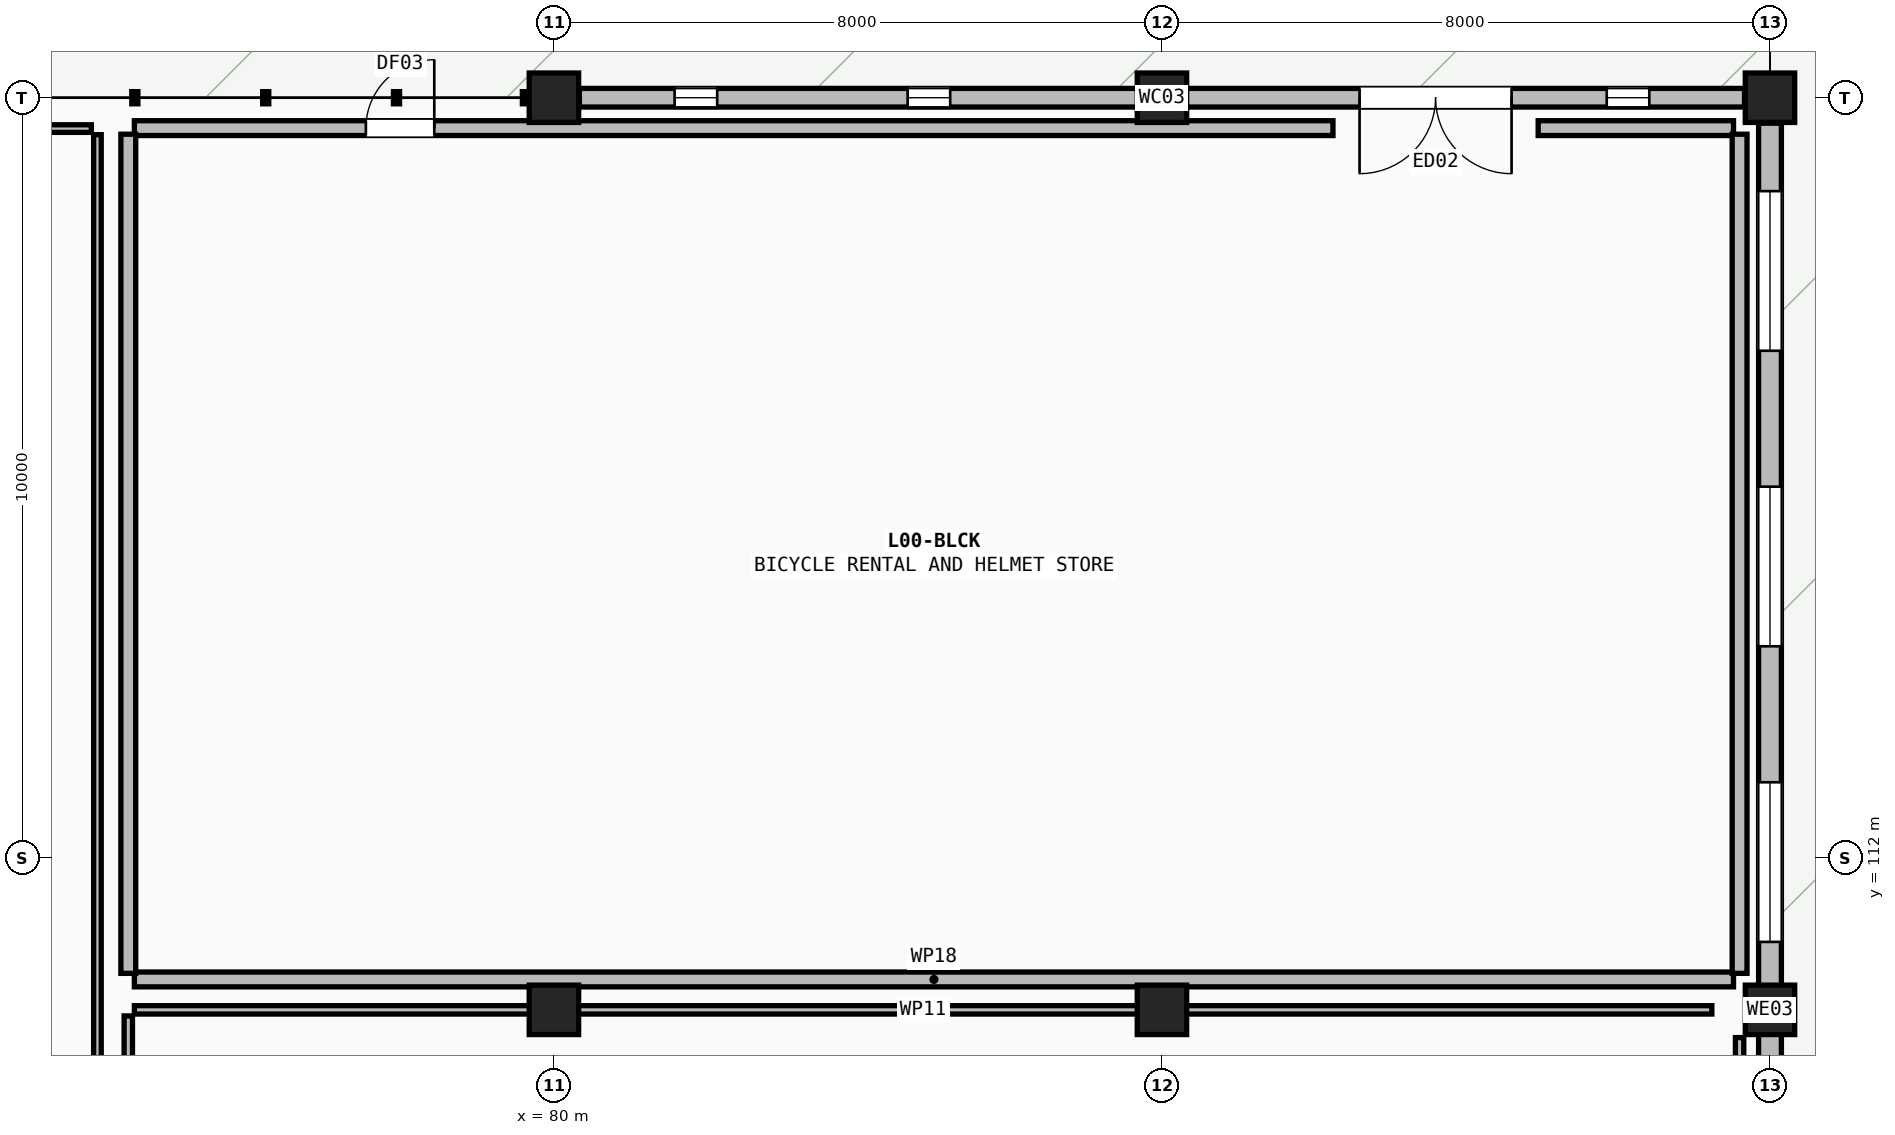
"""IFC4 building model, lengths in metres.
Left out: names, types, materials, properties, quantities, classifications, styles, units other than length and angle.
Written with IfcOpenShell. Run it as: python <this file> out.ifc"""

import sys

from ifc_helpers import new_model, si_unit, direction, frame, frame_2d, origin, origin_2d, place, context, subcontext, project, spatial, rectangle, extrude, element, fill, save


model = new_model("IFC4")
c1 = context("Model", 3, precision=1e-05, world=origin(), true_north=direction((0.0, 1.0)))
c2 = subcontext(c1, "Body", "Model", "MODEL_VIEW")
j1 = project(units=[si_unit("LENGTHUNIT", "METRE"), si_unit("PLANEANGLEUNIT", "RADIAN")], contexts=[c1])
p1 = place(None, origin())
s1 = spatial("IfcSite", under=j1, at=p1, CompositionType="ELEMENT")
p2 = place(p1, origin())
s2 = spatial("IfcBuilding", under=s1, at=p2, CompositionType="ELEMENT")
p3 = place(p2, origin())
s3 = spatial("IfcBuildingStorey", under=s2, at=p3, CompositionType="ELEMENT", Elevation=0.0)
for number, where, z_axis, x_axis in (
    (1, (80.0, 110.0, 0.0), (0.0, 0.0, 1.0), (1.0, 0.0, 0.0)),
    (2, (80.0, 122.0, 0.0), (0.0, 0.0, 1.0), (1.0, 0.0, 0.0)),
    (3, (88.0, 110.0, 0.0), (0.0, 0.0, 1.0), (1.0, 0.0, 0.0)),
    (4, (88.0, 122.0, 0.0), (0.0, 0.0, 1.0), (1.0, 0.0, 0.0)),
    (5, (96.0, 110.0, 0.0), (0.0, 0.0, 1.0), (1.0, 0.0, 0.0)),
    (6, (96.0, 122.0, 0.0), (0.0, 0.0, 1.0), (1.0, 0.0, 0.0)),
):
    element("IfcColumn", number, at=place(p3, frame(where, z_axis=z_axis, x_axis=x_axis)), inside=s3, PredefinedType="COLUMN", context=c2, shape_type="SweptSolid", body=[
        extrude(rectangle(XDim=0.65, YDim=0.65, at=origin_2d()), origin(), (0.0, 0.0, 1.0), 4.5),
    ])
p4 = place(p3, frame((95.665, 122.0, 0.0), z_axis=(0.0, 0.0, 1.0), x_axis=(-1.0, 0.0, 0.0)))
e7 = element("IfcWall", 7, at=p4, inside=s3, PredefinedType="USERDEFINED", context=c2, shape_type="SweptSolid", body=[
    extrude(rectangle(XDim=15.33, YDim=0.245, at=frame_2d((7.665, 0.0))), origin(), (0.0, 0.0, 1.0), 3.245),
])
p5 = place(p4, frame((3.065, 0.0, 0.0)))
e8 = element("IfcOpeningElement", 8, at=p5, cuts=e7, PredefinedType="OPENING", context=c2, shape_type="SweptSolid", body=[
    extrude(rectangle(XDim=2.0, YDim=2.15, at=frame_2d((1.0, 1.075))), frame((0.0, 0.133, 0.0), z_axis=(0.0, -1.0, 0.0), x_axis=(1.0, 0.0, 0.0)), (0.0, 0.0, 1.0), 0.265),
])
p6 = place(p4, frame((1.253, 0.0, 0.85)))
e9 = element("IfcOpeningElement", 9, at=p6, cuts=e7, PredefinedType="OPENING", context=c2, shape_type="SweptSolid", body=[
    extrude(rectangle(XDim=0.56, YDim=1.55, at=frame_2d((0.28, 0.775))), frame((0.0, 0.133, 0.0), z_axis=(0.0, -1.0, 0.0), x_axis=(1.0, 0.0, 0.0)), (0.0, 0.0, 1.0), 0.265),
])
p7 = place(p4, frame((10.451, 0.0, 0.85)))
e10 = element("IfcOpeningElement", 10, at=p7, cuts=e7, PredefinedType="OPENING", context=c2, shape_type="SweptSolid", body=[
    extrude(rectangle(XDim=0.56, YDim=1.55, at=frame_2d((0.28, 0.775))), frame((0.0, 0.133, 0.0), z_axis=(0.0, -1.0, 0.0), x_axis=(1.0, 0.0, 0.0)), (0.0, 0.0, 1.0), 0.265),
])
p8 = place(p4, frame((13.517, 0.0, 0.85)))
e11 = element("IfcOpeningElement", 11, at=p8, cuts=e7, PredefinedType="OPENING", context=c2, shape_type="SweptSolid", body=[
    extrude(rectangle(XDim=0.56, YDim=1.55, at=frame_2d((0.28, 0.775))), frame((0.0, 0.133, 0.0), z_axis=(0.0, -1.0, 0.0), x_axis=(1.0, 0.0, 0.0)), (0.0, 0.0, 1.0), 0.265),
])
p9 = place(p3, frame((96.0, 98.335, 0.0), z_axis=(0.0, 0.0, 1.0), x_axis=(0.0, 1.0, 0.0)))
e12 = element("IfcWall", 12, at=p9, inside=s3, PredefinedType="SOLIDWALL", context=c2, shape_type="SweptSolid", body=[
    extrude(rectangle(XDim=23.33, YDim=0.3, at=frame_2d((11.665, 0.0))), origin(), (0.0, 0.0, 1.0), 3.245),
])
p10 = place(p9, frame((7.065, 0.0, 0.0)))
e13 = element("IfcOpeningElement", 13, at=p10, cuts=e12, PredefinedType="OPENING", context=c2, shape_type="SweptSolid", body=[
    extrude(rectangle(XDim=2.0, YDim=2.15, at=frame_2d((1.0, 1.075))), frame((0.0, 0.16, 0.0), z_axis=(0.0, -1.0, 0.0), x_axis=(1.0, 0.0, 0.0)), (0.0, 0.0, 1.0), 0.32),
])
p11 = place(p9, frame((0.894, 0.0, 0.95)))
e14 = element("IfcOpeningElement", 14, at=p11, cuts=e12, PredefinedType="OPENING", context=c2, shape_type="SweptSolid", body=[
    extrude(rectangle(XDim=2.1, YDim=1.8, at=frame_2d((1.05, 0.9))), frame((0.0, 0.16, 0.0), z_axis=(0.0, -1.0, 0.0), x_axis=(1.0, 0.0, 0.0)), (0.0, 0.0, 1.0), 0.32),
])
p12 = place(p9, frame((12.559, 0.0, 0.95)))
e15 = element("IfcOpeningElement", 15, at=p12, cuts=e12, PredefinedType="OPENING", context=c2, shape_type="SweptSolid", body=[
    extrude(rectangle(XDim=2.1, YDim=1.8, at=frame_2d((1.05, 0.9))), frame((0.0, 0.16, 0.0), z_axis=(0.0, -1.0, 0.0), x_axis=(1.0, 0.0, 0.0)), (0.0, 0.0, 1.0), 0.32),
])
p13 = place(p9, frame((16.448, 0.0, 0.95)))
e16 = element("IfcOpeningElement", 16, at=p13, cuts=e12, PredefinedType="OPENING", context=c2, shape_type="SweptSolid", body=[
    extrude(rectangle(XDim=2.1, YDim=1.8, at=frame_2d((1.05, 0.9))), frame((0.0, 0.16, 0.0), z_axis=(0.0, -1.0, 0.0), x_axis=(1.0, 0.0, 0.0)), (0.0, 0.0, 1.0), 0.32),
])
p14 = place(p9, frame((20.336, 0.0, 0.95)))
e17 = element("IfcOpeningElement", 17, at=p14, cuts=e12, PredefinedType="OPENING", context=c2, shape_type="SweptSolid", body=[
    extrude(rectangle(XDim=2.1, YDim=1.8, at=frame_2d((1.05, 0.9))), frame((0.0, 0.16, 0.0), z_axis=(0.0, -1.0, 0.0), x_axis=(1.0, 0.0, 0.0)), (0.0, 0.0, 1.0), 0.32),
])
p15 = place(p3, frame((60.95, 121.594, 0.0), z_axis=(0.0, 0.0, 1.0), x_axis=(1.0, 0.0, 0.0)))
e18 = element("IfcWall", 18, at=p15, inside=s3, PredefinedType="PARTITIONING", context=c2, shape_type="SweptSolid", body=[
    extrude(rectangle(XDim=12.964, YDim=0.1, at=frame_2d((6.482, 0.0))), origin(), (0.0, 0.0, 1.0), 3.695),
])
p16 = place(p3, frame((73.994, 98.48, 0.0), z_axis=(0.0, 0.0, 1.0), x_axis=(0.0, 1.0, 0.0)))
e19 = element("IfcWall", 19, at=p16, inside=s3, PredefinedType="PARTITIONING", context=c2, shape_type="SweptSolid", body=[
    extrude(rectangle(XDim=23.034, YDim=0.1, at=frame_2d((11.517, 0.0))), origin(), (0.0, 0.0, 1.0), 3.595),
])
p17 = place(p3, frame((74.48, 110.0, 0.0), z_axis=(0.0, 0.0, 1.0), x_axis=(1.0, 0.0, 0.0)))
e20 = element("IfcWall", 20, at=p17, inside=s3, PredefinedType="PARTITIONING", context=c2, shape_type="SweptSolid", body=[
    extrude(rectangle(XDim=20.755, YDim=0.11, at=frame_2d((10.377, 0.0))), origin(), (0.0, 0.0, 1.0), 3.245),
])
p18 = place(p3, frame((74.4, 98.48, 0.0), z_axis=(0.0, 0.0, 1.0), x_axis=(0.0, 1.0, 0.0)))
e21 = element("IfcWall", 21, at=p18, inside=s3, PredefinedType="PARTITIONING", context=c2, shape_type="SweptSolid", body=[
    extrude(rectangle(XDim=11.44, YDim=0.11, at=frame_2d((5.72, 0.0))), origin(), (0.0, 0.0, 1.0), 3.595),
])
p19 = place(p3, frame((95.6, 107.75, 0.0), z_axis=(0.0, 0.0, 1.0), x_axis=(0.0, 1.0, 0.0)))
e22 = element("IfcWall", 22, at=p19, inside=s3, PredefinedType="PARTITIONING", context=c2, shape_type="SweptSolid", body=[
    extrude(rectangle(XDim=1.885, YDim=0.11, at=frame_2d((0.942, 0.0))), origin(), (0.0, 0.0, 1.0), 3.245),
])
p20 = place(p3, frame((74.48, 110.4, 0.0), z_axis=(0.0, 0.0, 1.0), x_axis=(1.0, 0.0, 0.0)))
e23 = element("IfcWall", 23, at=p20, inside=s3, PredefinedType="PARTITIONING", context=c2, shape_type="SweptSolid", body=[
    extrude(rectangle(XDim=21.04, YDim=0.195, at=frame_2d((10.52, 0.0))), origin(), (0.0, 0.0, 1.0), 3.245),
])
p21 = place(p3, frame((74.48, 121.6, 0.0), z_axis=(0.0, 0.0, 1.0), x_axis=(1.0, 0.0, 0.0)))
e24 = element("IfcWall", 24, at=p21, inside=s3, PredefinedType="PARTITIONING", context=c2, shape_type="SweptSolid", body=[
    extrude(rectangle(XDim=15.77, YDim=0.195, at=frame_2d((7.885, 0.0))), origin(), (0.0, 0.0, 1.0), 3.245),
])
p22 = place(p21, frame((3.046, 0.0, 0.0)))
e25 = element("IfcOpeningElement", 25, at=p22, cuts=e24, PredefinedType="OPENING", context=c2, shape_type="SweptSolid", body=[
    extrude(rectangle(XDim=0.9, YDim=2.05, at=frame_2d((0.45, 1.025))), frame((0.0, 0.107, 0.0), z_axis=(0.0, -1.0, 0.0), x_axis=(1.0, 0.0, 0.0)), (0.0, 0.0, 1.0), 0.215),
])
p23 = place(p3, frame((92.95, 121.6, 0.0), z_axis=(0.0, 0.0, 1.0), x_axis=(1.0, 0.0, 0.0)))
e26 = element("IfcWall", 26, at=p23, inside=s3, PredefinedType="PARTITIONING", context=c2, shape_type="SweptSolid", body=[
    extrude(rectangle(XDim=2.57, YDim=0.195, at=frame_2d((1.285, 0.0))), origin(), (0.0, 0.0, 1.0), 3.245),
])
for number, where, z_axis, x_axis in (
    (27, (74.4, 110.48, 0.0), (0.0, 0.0, 1.0), (0.0, 1.0, 0.0)),
    (28, (95.6, 110.48, 0.0), (0.0, 0.0, 1.0), (0.0, 1.0, 0.0)),
):
    element("IfcWall", number, at=place(p3, frame(where, z_axis=z_axis, x_axis=x_axis)), inside=s3, PredefinedType="PARTITIONING", context=c2, shape_type="SweptSolid", body=[
        extrude(rectangle(XDim=11.04, YDim=0.195, at=frame_2d((5.52, 0.0))), origin(), (0.0, 0.0, 1.0), 4.245),
    ])
p24 = place(p5, origin())
e29 = element("IfcDoor", 29, at=p24, inside=s3, OperationType="DOUBLE_DOOR_SINGLE_SWING", PredefinedType="DOOR", context=c2, shape_type="SweptSolid", body=[
    extrude(rectangle(XDim=2.0, YDim=2.15, at=frame_2d((1.0, 1.075))), frame((0.0, 0.025, 0.0), z_axis=(0.0, -1.0, 0.0), x_axis=(1.0, 0.0, 0.0)), (0.0, 0.0, 1.0), 0.05),
])
fill(e8, e29)
p25 = place(p6, origin())
e30 = element("IfcWindow", 30, at=p25, inside=s3, PartitioningType="SINGLE_PANEL", PredefinedType="WINDOW", context=c2, shape_type="SweptSolid", body=[
    extrude(rectangle(XDim=0.56, YDim=1.55, at=frame_2d((0.28, 0.775))), frame((0.0, 0.03, 0.0), z_axis=(0.0, -1.0, 0.0), x_axis=(1.0, 0.0, 0.0)), (0.0, 0.0, 1.0), 0.06),
])
fill(e9, e30)
p26 = place(p7, origin())
e31 = element("IfcWindow", 31, at=p26, inside=s3, PartitioningType="SINGLE_PANEL", PredefinedType="WINDOW", context=c2, shape_type="SweptSolid", body=[
    extrude(rectangle(XDim=0.56, YDim=1.55, at=frame_2d((0.28, 0.775))), frame((0.0, 0.03, 0.0), z_axis=(0.0, -1.0, 0.0), x_axis=(1.0, 0.0, 0.0)), (0.0, 0.0, 1.0), 0.06),
])
fill(e10, e31)
p27 = place(p8, origin())
e32 = element("IfcWindow", 32, at=p27, inside=s3, PartitioningType="SINGLE_PANEL", PredefinedType="WINDOW", context=c2, shape_type="SweptSolid", body=[
    extrude(rectangle(XDim=0.56, YDim=1.55, at=frame_2d((0.28, 0.775))), frame((0.0, 0.03, 0.0), z_axis=(0.0, -1.0, 0.0), x_axis=(1.0, 0.0, 0.0)), (0.0, 0.0, 1.0), 0.06),
])
fill(e11, e32)
p28 = place(p12, origin())
e33 = element("IfcWindow", 33, at=p28, inside=s3, PartitioningType="SINGLE_PANEL", PredefinedType="WINDOW", context=c2, shape_type="SweptSolid", body=[
    extrude(rectangle(XDim=2.1, YDim=1.8, at=frame_2d((1.05, 0.9))), frame((0.0, 0.03, 0.0), z_axis=(0.0, -1.0, 0.0), x_axis=(1.0, 0.0, 0.0)), (0.0, 0.0, 1.0), 0.06),
])
fill(e15, e33)
p29 = place(p13, origin())
e34 = element("IfcWindow", 34, at=p29, inside=s3, PartitioningType="SINGLE_PANEL", PredefinedType="WINDOW", context=c2, shape_type="SweptSolid", body=[
    extrude(rectangle(XDim=2.1, YDim=1.8, at=frame_2d((1.05, 0.9))), frame((0.0, 0.03, 0.0), z_axis=(0.0, -1.0, 0.0), x_axis=(1.0, 0.0, 0.0)), (0.0, 0.0, 1.0), 0.06),
])
fill(e16, e34)
p30 = place(p14, origin())
e35 = element("IfcWindow", 35, at=p30, inside=s3, PartitioningType="SINGLE_PANEL", PredefinedType="WINDOW", context=c2, shape_type="SweptSolid", body=[
    extrude(rectangle(XDim=2.1, YDim=1.8, at=frame_2d((1.05, 0.9))), frame((0.0, 0.03, 0.0), z_axis=(0.0, -1.0, 0.0), x_axis=(1.0, 0.0, 0.0)), (0.0, 0.0, 1.0), 0.06),
])
fill(e17, e35)
p31 = place(p22, origin())
e36 = element("IfcDoor", 36, at=p31, inside=s3, OperationType="SINGLE_SWING_RIGHT", PredefinedType="DOOR", context=c2, shape_type="SweptSolid", body=[
    extrude(rectangle(XDim=0.9, YDim=2.05, at=frame_2d((0.45, 1.025))), frame((0.0, 0.025, 0.0), z_axis=(0.0, -1.0, 0.0), x_axis=(1.0, 0.0, 0.0)), (0.0, 0.0, 1.0), 0.05),
])
fill(e25, e36)
save(model, sys.argv[1])
